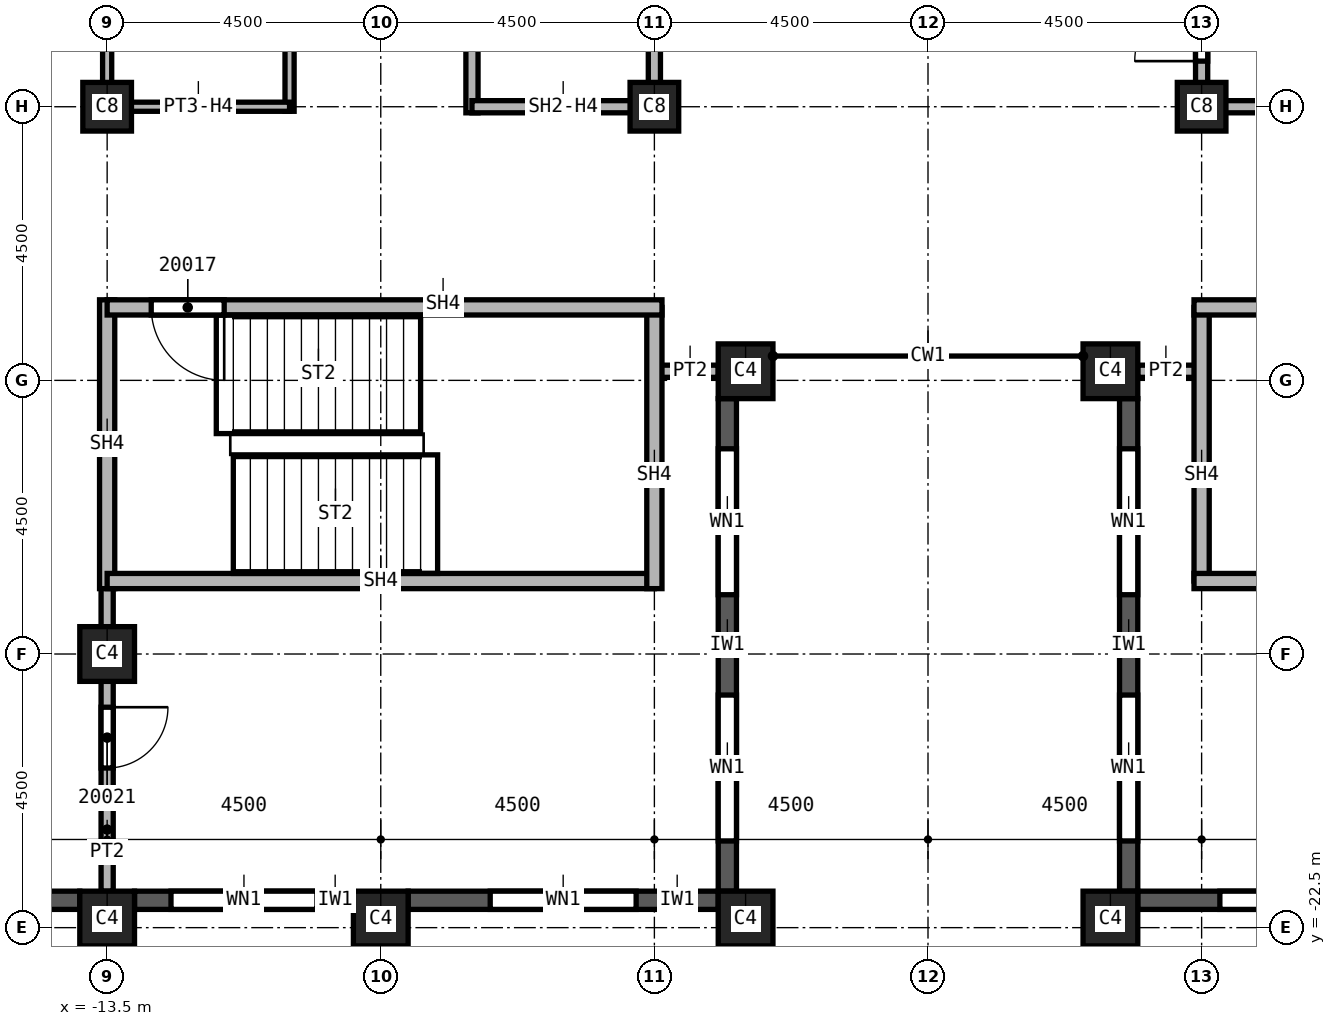
"""IFC4 building model, lengths in metres.
Left out: names, types, materials, properties, quantities, classifications, styles, units other than length and angle.
Written with IfcOpenShell. Run it as: python <this file> out.ifc"""

import sys

from ifc_helpers import new_model, si_unit, direction, frame, frame_2d, origin, origin_2d, place, context, subcontext, project, spatial, rectangle, extrude, element, fill, save


model = new_model("IFC4")
c1 = context("Model", 3, precision=1e-05, world=origin(), true_north=direction((0.0, 1.0)))
c2 = subcontext(c1, "Body", "Model", "MODEL_VIEW")
j1 = project(units=[si_unit("LENGTHUNIT", "METRE"), si_unit("PLANEANGLEUNIT", "RADIAN")], contexts=[c1])
p1 = place(None, origin())
s1 = spatial("IfcSite", under=j1, at=p1, CompositionType="ELEMENT")
p2 = place(p1, origin())
s2 = spatial("IfcBuilding", under=s1, at=p2, CompositionType="ELEMENT")
p3 = place(p2, frame((0.0, 0.0, 286.0)))
s3 = spatial("IfcBuildingStorey", under=s2, at=p3, CompositionType="ELEMENT", Elevation=286.0)
p4 = place(p3, frame((-13.5, -18.0, 0.0), z_axis=(0.0, 0.0, 1.0), x_axis=(1.0, 0.0, 0.0)))
e1 = element("IfcColumn", 1, at=p4, inside=s3, PredefinedType="COLUMN", context=c2, shape_type="SweptSolid", body=[
    extrude(rectangle(XDim=0.9, YDim=0.9, at=origin_2d()), origin(), (0.0, 0.0, 1.0), 3.72),
])
for number, where, z_axis, x_axis in (
    (2, (4.5, -9.0, 0.0), (0.0, 0.0, 1.0), (1.0, 0.0, 0.0)),
    (3, (-4.5, -9.0, 0.0), (0.0, 0.0, 1.0), (1.0, 0.0, 0.0)),
    (4, (-13.5, -9.0, 0.0), (0.0, 0.0, 1.0), (1.0, 0.0, 0.0)),
):
    element("IfcColumn", number, at=place(p3, frame(where, z_axis=z_axis, x_axis=x_axis)), inside=s3, PredefinedType="COLUMN", context=c2, shape_type="SweptSolid", body=[
        extrude(rectangle(XDim=0.8, YDim=0.8, at=origin_2d()), origin(), (0.0, 0.0, 1.0), 3.72),
    ])
for number, where, z_axis, x_axis in (
    (5, (3.0, -22.35, 0.0), (0.0, 0.0, 1.0), (1.0, 0.0, 0.0)),
    (6, (-3.0, -22.35, 0.0), (0.0, 0.0, 1.0), (1.0, 0.0, 0.0)),
    (7, (-9.0, -22.35, 0.0), (0.0, 0.0, 1.0), (1.0, 0.0, 0.0)),
    (8, (-13.5, -22.35, 0.0), (0.0, 0.0, 1.0), (1.0, 0.0, 0.0)),
    (9, (3.0, -13.35, 0.0), (0.0, 0.0, 1.0), (1.0, 0.0, 0.0)),
    (10, (-3.0, -13.35, 0.0), (0.0, 0.0, 1.0), (1.0, 0.0, 0.0)),
):
    element("IfcColumn", number, at=place(p3, frame(where, z_axis=z_axis, x_axis=x_axis)), inside=s3, PredefinedType="COLUMN", context=c2, shape_type="SweptSolid", body=[
        extrude(rectangle(XDim=0.9, YDim=0.9, at=origin_2d()), origin(), (0.0, 0.0, 1.0), 3.72),
    ])
p5 = place(p3, frame((-17.55, -22.05, 0.0), z_axis=(0.0, 0.0, 1.0), x_axis=(1.0, 0.0, 0.0)))
e11 = element("IfcWall", 11, at=p5, inside=s3, PredefinedType="SOLIDWALL", context=c2, shape_type="SweptSolid", body=[
    extrude(rectangle(XDim=3.6, YDim=0.3, at=frame_2d((1.8, 0.0))), origin(), (0.0, 0.0, 1.0), 3.12),
])
p6 = place(p5, frame((0.775, 0.0, 0.8)))
e12 = element("IfcOpeningElement", 12, at=p6, cuts=e11, PredefinedType="OPENING", context=c2, shape_type="SweptSolid", body=[
    extrude(rectangle(XDim=1.0, YDim=1.95, at=frame_2d((0.5, 0.975))), frame((0.0, 0.15, 0.0), z_axis=(0.0, -1.0, 0.0), x_axis=(1.0, 0.0, 0.0)), (0.0, 0.0, 1.0), 0.3),
])
p7 = place(p5, frame((2.375, 0.0, 0.8)))
e13 = element("IfcOpeningElement", 13, at=p7, cuts=e11, PredefinedType="OPENING", context=c2, shape_type="SweptSolid", body=[
    extrude(rectangle(XDim=0.6, YDim=1.95, at=frame_2d((0.3, 0.975))), frame((0.0, 0.15, 0.0), z_axis=(0.0, -1.0, 0.0), x_axis=(1.0, 0.0, 0.0)), (0.0, 0.0, 1.0), 0.3),
])
p8 = place(p3, frame((-13.05, -22.05, 0.0), z_axis=(0.0, 0.0, 1.0), x_axis=(1.0, 0.0, 0.0)))
e14 = element("IfcWall", 14, at=p8, inside=s3, PredefinedType="SOLIDWALL", context=c2, shape_type="SweptSolid", body=[
    extrude(rectangle(XDim=3.6, YDim=0.3, at=frame_2d((1.8, 0.0))), origin(), (0.0, 0.0, 1.0), 3.12),
])
p9 = place(p8, frame((0.6, 0.0, 0.8)))
e15 = element("IfcOpeningElement", 15, at=p9, cuts=e14, PredefinedType="OPENING", context=c2, shape_type="SweptSolid", body=[
    extrude(rectangle(XDim=2.4, YDim=1.95, at=frame_2d((1.2, 0.975))), frame((0.0, 0.15, 0.0), z_axis=(0.0, -1.0, 0.0), x_axis=(1.0, 0.0, 0.0)), (0.0, 0.0, 1.0), 0.3),
])
p10 = place(p3, frame((-8.55, -22.05, 0.0), z_axis=(0.0, 0.0, 1.0), x_axis=(1.0, 0.0, 0.0)))
e16 = element("IfcWall", 16, at=p10, inside=s3, PredefinedType="SOLIDWALL", context=c2, shape_type="SweptSolid", body=[
    extrude(rectangle(XDim=5.1, YDim=0.3, at=frame_2d((2.55, 0.0))), origin(), (0.0, 0.0, 1.0), 3.12),
])
p11 = place(p10, frame((1.35, 0.0, 0.8)))
e17 = element("IfcOpeningElement", 17, at=p11, cuts=e16, PredefinedType="OPENING", context=c2, shape_type="SweptSolid", body=[
    extrude(rectangle(XDim=2.4, YDim=1.95, at=frame_2d((1.2, 0.975))), frame((0.0, 0.15, 0.0), z_axis=(0.0, -1.0, 0.0), x_axis=(1.0, 0.0, 0.0)), (0.0, 0.0, 1.0), 0.3),
])
p12 = place(p3, frame((-3.3, -21.9, 0.0), z_axis=(0.0, 0.0, 1.0), x_axis=(0.0, 1.0, 0.0)))
e18 = element("IfcWall", 18, at=p12, inside=s3, PredefinedType="SOLIDWALL", context=c2, shape_type="SweptSolid", body=[
    extrude(rectangle(XDim=8.1, YDim=0.3, at=frame_2d((4.05, 0.0))), origin(), (0.0, 0.0, 1.0), 3.12),
])
p13 = place(p12, frame((0.825, 0.0, 0.8)))
e19 = element("IfcOpeningElement", 19, at=p13, cuts=e18, PredefinedType="OPENING", context=c2, shape_type="SweptSolid", body=[
    extrude(rectangle(XDim=2.4, YDim=1.95, at=frame_2d((1.2, 0.975))), frame((0.0, 0.15, 0.0), z_axis=(0.0, -1.0, 0.0), x_axis=(1.0, 0.0, 0.0)), (0.0, 0.0, 1.0), 0.3),
])
p14 = place(p12, frame((4.875, 0.0, 0.8)))
e20 = element("IfcOpeningElement", 20, at=p14, cuts=e18, PredefinedType="OPENING", context=c2, shape_type="SweptSolid", body=[
    extrude(rectangle(XDim=2.4, YDim=1.95, at=frame_2d((1.2, 0.975))), frame((0.0, 0.15, 0.0), z_axis=(0.0, -1.0, 0.0), x_axis=(1.0, 0.0, 0.0)), (0.0, 0.0, 1.0), 0.3),
])
p15 = place(p3, frame((3.3, -13.8, 0.0), z_axis=(0.0, 0.0, 1.0), x_axis=(0.0, -1.0, 0.0)))
e21 = element("IfcWall", 21, at=p15, inside=s3, PredefinedType="SOLIDWALL", context=c2, shape_type="SweptSolid", body=[
    extrude(rectangle(XDim=8.1, YDim=0.3, at=frame_2d((4.05, 0.0))), origin(), (0.0, 0.0, 1.0), 3.12),
])
p16 = place(p15, frame((0.825, 0.0, 0.8)))
e22 = element("IfcOpeningElement", 22, at=p16, cuts=e21, PredefinedType="OPENING", context=c2, shape_type="SweptSolid", body=[
    extrude(rectangle(XDim=2.4, YDim=1.95, at=frame_2d((1.2, 0.975))), frame((0.0, 0.15, 0.0), z_axis=(0.0, -1.0, 0.0), x_axis=(1.0, 0.0, 0.0)), (0.0, 0.0, 1.0), 0.3),
])
p17 = place(p15, frame((4.875, 0.0, 0.8)))
e23 = element("IfcOpeningElement", 23, at=p17, cuts=e21, PredefinedType="OPENING", context=c2, shape_type="SweptSolid", body=[
    extrude(rectangle(XDim=2.4, YDim=1.95, at=frame_2d((1.2, 0.975))), frame((0.0, 0.15, 0.0), z_axis=(0.0, -1.0, 0.0), x_axis=(1.0, 0.0, 0.0)), (0.0, 0.0, 1.0), 0.3),
])
p18 = place(p3, frame((3.45, -22.05, 0.0), z_axis=(0.0, 0.0, 1.0), x_axis=(1.0, 0.0, 0.0)))
e24 = element("IfcWall", 24, at=p18, inside=s3, PredefinedType="SOLIDWALL", context=c2, shape_type="SweptSolid", body=[
    extrude(rectangle(XDim=5.1, YDim=0.3, at=frame_2d((2.55, 0.0))), origin(), (0.0, 0.0, 1.0), 3.12),
])
p19 = place(p18, frame((1.35, 0.0, 0.8)))
e25 = element("IfcOpeningElement", 25, at=p19, cuts=e24, PredefinedType="OPENING", context=c2, shape_type="SweptSolid", body=[
    extrude(rectangle(XDim=2.4, YDim=1.95, at=frame_2d((1.2, 0.975))), frame((0.0, 0.15, 0.0), z_axis=(0.0, -1.0, 0.0), x_axis=(1.0, 0.0, 0.0)), (0.0, 0.0, 1.0), 0.3),
])
p20 = place(p3, frame((-13.5, -16.675, 0.0), z_axis=(0.0, 0.0, 1.0), x_axis=(0.0, -1.0, 0.0)))
e26 = element("IfcWall", 26, at=p20, inside=s3, PredefinedType="PARTITIONING", context=c2, shape_type="SweptSolid", body=[
    extrude(rectangle(XDim=5.225, YDim=0.2, at=frame_2d((2.612, 0.0))), origin(), (0.0, 0.0, 1.0), 3.72),
])
p21 = place(p20, frame((2.2, 0.0, 0.0)))
e27 = element("IfcOpeningElement", 27, at=p21, cuts=e26, PredefinedType="OPENING", context=c2, shape_type="SweptSolid", body=[
    extrude(rectangle(XDim=1.0, YDim=2.1, at=frame_2d((0.5, 1.05))), frame((0.0, 0.1, 0.0), z_axis=(0.0, -1.0, 0.0), x_axis=(1.0, 0.0, 0.0)), (0.0, 0.0, 1.0), 0.2),
])
for number, where, z_axis, x_axis in (
    (28, (-3.45, -13.35, 0.0), (0.0, 0.0, 1.0), (-1.0, 0.0, 0.0)),
    (29, (4.5, -13.35, 0.0), (0.0, 0.0, 1.0), (-1.0, 0.0, 0.0)),
):
    element("IfcWall", number, at=place(p3, frame(where, z_axis=z_axis, x_axis=x_axis)), inside=s3, PredefinedType="PARTITIONING", context=c2, shape_type="SweptSolid", body=[
        extrude(rectangle(XDim=1.05, YDim=0.2, at=frame_2d((0.525, 0.0))), origin(), (0.0, 0.0, 1.0), 3.72),
    ])
p22 = place(p3, frame((-7.5, -9.1, 0.0), z_axis=(0.0, 0.0, 1.0), x_axis=(0.0, 1.0, 0.0)))
e30 = element("IfcWall", 30, at=p22, inside=s3, PredefinedType="SOLIDWALL", context=c2, shape_type="SweptSolid", body=[
    extrude(rectangle(XDim=6.225, YDim=0.2, at=frame_2d((3.113, 0.0))), origin(), (0.0, 0.0, 1.0), 3.72),
])
p23 = place(p3, frame((-4.5, -9.0, 0.0), z_axis=(0.0, 0.0, 1.0), x_axis=(-1.0, 0.0, 0.0)))
e31 = element("IfcWall", 31, at=p23, inside=s3, PredefinedType="SOLIDWALL", context=c2, shape_type="SweptSolid", body=[
    extrude(rectangle(XDim=3.0, YDim=0.2, at=frame_2d((1.5, 0.0))), origin(), (0.0, 0.0, 1.0), 3.042),
])
p24 = place(p3, frame((-4.5, 0.0, 0.0), z_axis=(0.0, 0.0, 1.0), x_axis=(0.0, -1.0, 0.0)))
e32 = element("IfcWall", 32, at=p24, inside=s3, PredefinedType="SOLIDWALL", context=c2, shape_type="SweptSolid", body=[
    extrude(rectangle(XDim=9.1, YDim=0.2, at=frame_2d((4.55, 0.0))), origin(), (0.0, 0.0, 1.0), 3.042),
])
p25 = place(p24, frame((6.25, 0.0, 0.0)))
e33 = element("IfcOpeningElement", 33, at=p25, cuts=e32, PredefinedType="OPENING", context=c2, shape_type="SweptSolid", body=[
    extrude(rectangle(XDim=1.1, YDim=2.1, at=frame_2d((0.55, 1.05))), frame((0.0, 0.1, 0.0), z_axis=(0.0, -1.0, 0.0), x_axis=(1.0, 0.0, 0.0)), (0.0, 0.0, 1.0), 0.2),
])
p26 = place(p24, frame((4.6, 0.0, 0.0)))
e34 = element("IfcOpeningElement", 34, at=p26, cuts=e32, PredefinedType="OPENING", context=c2, shape_type="SweptSolid", body=[
    extrude(rectangle(XDim=1.1, YDim=2.1, at=frame_2d((0.55, 1.05))), frame((0.0, 0.1, 0.0), z_axis=(0.0, -1.0, 0.0), x_axis=(1.0, 0.0, 0.0)), (0.0, 0.0, 1.0), 0.2),
])
p27 = place(p3, frame((4.5, -9.1, 0.0), z_axis=(0.0, 0.0, 1.0), x_axis=(0.0, 1.0, 0.0)))
e35 = element("IfcWall", 35, at=p27, inside=s3, PredefinedType="SOLIDWALL", context=c2, shape_type="SweptSolid", body=[
    extrude(rectangle(XDim=3.1, YDim=0.2, at=frame_2d((1.55, 0.0))), origin(), (0.0, 0.0, 1.0), 3.042),
])
p28 = place(p27, frame((0.85, 0.0, 0.0)))
e36 = element("IfcOpeningElement", 36, at=p28, cuts=e35, PredefinedType="OPENING", context=c2, shape_type="SweptSolid", body=[
    extrude(rectangle(XDim=1.1, YDim=2.1, at=frame_2d((0.55, 1.05))), frame((0.0, 0.1, 0.0), z_axis=(0.0, -1.0, 0.0), x_axis=(1.0, 0.0, 0.0)), (0.0, 0.0, 1.0), 0.2),
])
p29 = place(p3, frame((7.5, -9.0, 0.0), z_axis=(0.0, 0.0, 1.0), x_axis=(-1.0, 0.0, 0.0)))
e37 = element("IfcWall", 37, at=p29, inside=s3, PredefinedType="SOLIDWALL", context=c2, shape_type="SweptSolid", body=[
    extrude(rectangle(XDim=3.0, YDim=0.2, at=frame_2d((1.5, 0.0))), origin(), (0.0, 0.0, 1.0), 3.042),
])
p30 = place(p3, frame((-13.5, -12.175, 0.0), z_axis=(0.0, 0.0, 1.0), x_axis=(0.0, -1.0, 0.0)))
e38 = element("IfcWall", 38, at=p30, inside=s3, PredefinedType="SOLIDWALL", context=c2, shape_type="SweptSolid", body=[
    extrude(rectangle(XDim=4.75, YDim=0.25, at=frame_2d((2.375, 0.0))), origin(), (0.0, 0.0, 1.0), 3.72),
])
p31 = place(p3, frame((-4.5, -16.8, 0.0), z_axis=(0.0, 0.0, 1.0), x_axis=(-1.0, 0.0, 0.0)))
e39 = element("IfcWall", 39, at=p31, inside=s3, PredefinedType="SOLIDWALL", context=c2, shape_type="SweptSolid", body=[
    extrude(rectangle(XDim=9.0, YDim=0.25, at=frame_2d((4.5, 0.0))), origin(), (0.0, 0.0, 1.0), 3.72),
])
p32 = place(p3, frame((-4.5, -12.3, 0.0), z_axis=(0.0, 0.0, 1.0), x_axis=(0.0, -1.0, 0.0)))
e40 = element("IfcWall", 40, at=p32, inside=s3, PredefinedType="SOLIDWALL", context=c2, shape_type="SweptSolid", body=[
    extrude(rectangle(XDim=4.625, YDim=0.25, at=frame_2d((2.312, 0.0))), origin(), (0.0, 0.0, 1.0), 3.72),
])
p33 = place(p3, frame((-4.375, -12.3, 0.0), z_axis=(0.0, 0.0, 1.0), x_axis=(-1.0, 0.0, 0.0)))
e41 = element("IfcWall", 41, at=p33, inside=s3, PredefinedType="SOLIDWALL", context=c2, shape_type="SweptSolid", body=[
    extrude(rectangle(XDim=9.125, YDim=0.25, at=frame_2d((4.562, 0.0))), origin(), (0.0, 0.0, 1.0), 3.72),
])
p34 = place(p33, frame((7.2, 0.0, 0.0)))
e42 = element("IfcOpeningElement", 42, at=p34, cuts=e41, PredefinedType="OPENING", context=c2, shape_type="SweptSolid", body=[
    extrude(rectangle(XDim=1.2, YDim=2.1, at=frame_2d((0.6, 1.05))), frame((0.0, 0.125, 0.0), z_axis=(0.0, -1.0, 0.0), x_axis=(1.0, 0.0, 0.0)), (0.0, 0.0, 1.0), 0.25),
])
p35 = place(p3, frame((4.5, -16.8, 0.0), z_axis=(0.0, 0.0, 1.0), x_axis=(0.0, 1.0, 0.0)))
e43 = element("IfcWall", 43, at=p35, inside=s3, PredefinedType="SOLIDWALL", context=c2, shape_type="SweptSolid", body=[
    extrude(rectangle(XDim=4.5, YDim=0.25, at=frame_2d((2.25, 0.0))), origin(), (0.0, 0.0, 1.0), 3.72),
])
p36 = place(p3, frame((13.5, -16.8, 0.0), z_axis=(0.0, 0.0, 1.0), x_axis=(-1.0, 0.0, 0.0)))
e44 = element("IfcWall", 44, at=p36, inside=s3, PredefinedType="SOLIDWALL", context=c2, shape_type="SweptSolid", body=[
    extrude(rectangle(XDim=9.125, YDim=0.25, at=frame_2d((4.562, 0.0))), origin(), (0.0, 0.0, 1.0), 3.72),
])
p37 = place(p3, frame((13.5, -12.3, 0.0), z_axis=(0.0, 0.0, 1.0), x_axis=(-1.0, 0.0, 0.0)))
e45 = element("IfcWall", 45, at=p37, inside=s3, PredefinedType="SOLIDWALL", context=c2, shape_type="SweptSolid", body=[
    extrude(rectangle(XDim=9.125, YDim=0.25, at=frame_2d((4.562, 0.0))), origin(), (0.0, 0.0, 1.0), 3.72),
])
p38 = place(p37, frame((0.6, 0.0, 0.0)))
e46 = element("IfcOpeningElement", 46, at=p38, cuts=e45, PredefinedType="OPENING", context=c2, shape_type="SweptSolid", body=[
    extrude(rectangle(XDim=1.2, YDim=2.1, at=frame_2d((0.6, 1.05))), frame((0.0, 0.125, 0.0), z_axis=(0.0, -1.0, 0.0), x_axis=(1.0, 0.0, 0.0)), (0.0, 0.0, 1.0), 0.25),
])
p39 = place(p3, frame((-13.5, -9.075, 0.0), z_axis=(0.0, 0.0, 1.0), x_axis=(0.0, 1.0, 0.0)))
e47 = element("IfcWall", 47, at=p39, inside=s3, PredefinedType="PARTITIONING", context=c2, shape_type="SweptSolid", body=[
    extrude(rectangle(XDim=4.575, YDim=0.15, at=frame_2d((2.288, 0.0))), origin(), (0.0, 0.0, 1.0), 3.042),
])
p40 = place(p3, frame((-10.5, -9.075, 0.0), z_axis=(0.0, 0.0, 1.0), x_axis=(0.0, 1.0, 0.0)))
e48 = element("IfcWall", 48, at=p40, inside=s3, PredefinedType="PARTITIONING", context=c2, shape_type="SweptSolid", body=[
    extrude(rectangle(XDim=4.65, YDim=0.15, at=frame_2d((2.325, 0.0))), origin(), (0.0, 0.0, 1.0), 3.72),
])
p41 = place(p40, frame((2.8, 0.0, 0.0)))
e49 = element("IfcOpeningElement", 49, at=p41, cuts=e48, PredefinedType="OPENING", context=c2, shape_type="SweptSolid", body=[
    extrude(rectangle(XDim=0.9, YDim=2.1, at=frame_2d((0.45, 1.05))), frame((0.0, 0.075, 0.0), z_axis=(0.0, -1.0, 0.0), x_axis=(1.0, 0.0, 0.0)), (0.0, 0.0, 1.0), 0.15),
])
p42 = place(p3, frame((-10.5, -9.0, 0.0), z_axis=(0.0, 0.0, 1.0), x_axis=(-1.0, 0.0, 0.0)))
e50 = element("IfcWall", 50, at=p42, inside=s3, PredefinedType="PARTITIONING", context=c2, shape_type="SweptSolid", body=[
    extrude(rectangle(XDim=3.0, YDim=0.15, at=frame_2d((1.5, 0.0))), origin(), (0.0, 0.0, 1.0), 3.042),
])
p43 = place(p9, origin())
e51 = element("IfcWindow", 51, at=p43, inside=s3, PartitioningType="SINGLE_PANEL", PredefinedType="WINDOW", context=c2, shape_type="SweptSolid", body=[
    extrude(rectangle(XDim=2.4, YDim=1.95, at=frame_2d((1.2, 0.975))), frame((0.0, 0.03, 0.0), z_axis=(0.0, -1.0, 0.0), x_axis=(1.0, 0.0, 0.0)), (0.0, 0.0, 1.0), 0.06),
])
fill(e15, e51)
p44 = place(p11, origin())
e52 = element("IfcWindow", 52, at=p44, inside=s3, PartitioningType="SINGLE_PANEL", PredefinedType="WINDOW", context=c2, shape_type="SweptSolid", body=[
    extrude(rectangle(XDim=2.4, YDim=1.95, at=frame_2d((1.2, 0.975))), frame((0.0, 0.03, 0.0), z_axis=(0.0, -1.0, 0.0), x_axis=(1.0, 0.0, 0.0)), (0.0, 0.0, 1.0), 0.06),
])
fill(e17, e52)
p45 = place(p13, origin())
e53 = element("IfcWindow", 53, at=p45, inside=s3, PartitioningType="SINGLE_PANEL", PredefinedType="WINDOW", context=c2, shape_type="SweptSolid", body=[
    extrude(rectangle(XDim=2.4, YDim=1.95, at=frame_2d((1.2, 0.975))), frame((0.0, 0.03, 0.0), z_axis=(0.0, -1.0, 0.0), x_axis=(1.0, 0.0, 0.0)), (0.0, 0.0, 1.0), 0.06),
])
fill(e19, e53)
p46 = place(p14, origin())
e54 = element("IfcWindow", 54, at=p46, inside=s3, PartitioningType="SINGLE_PANEL", PredefinedType="WINDOW", context=c2, shape_type="SweptSolid", body=[
    extrude(rectangle(XDim=2.4, YDim=1.95, at=frame_2d((1.2, 0.975))), frame((0.0, 0.03, 0.0), z_axis=(0.0, -1.0, 0.0), x_axis=(1.0, 0.0, 0.0)), (0.0, 0.0, 1.0), 0.06),
])
fill(e20, e54)
p47 = place(p16, origin())
e55 = element("IfcWindow", 55, at=p47, inside=s3, PartitioningType="SINGLE_PANEL", PredefinedType="WINDOW", context=c2, shape_type="SweptSolid", body=[
    extrude(rectangle(XDim=2.4, YDim=1.95, at=frame_2d((1.2, 0.975))), frame((0.0, 0.03, 0.0), z_axis=(0.0, -1.0, 0.0), x_axis=(1.0, 0.0, 0.0)), (0.0, 0.0, 1.0), 0.06),
])
fill(e22, e55)
p48 = place(p17, origin())
e56 = element("IfcWindow", 56, at=p48, inside=s3, PartitioningType="SINGLE_PANEL", PredefinedType="WINDOW", context=c2, shape_type="SweptSolid", body=[
    extrude(rectangle(XDim=2.4, YDim=1.95, at=frame_2d((1.2, 0.975))), frame((0.0, 0.03, 0.0), z_axis=(0.0, -1.0, 0.0), x_axis=(1.0, 0.0, 0.0)), (0.0, 0.0, 1.0), 0.06),
])
fill(e23, e56)
p49 = place(p19, origin())
e57 = element("IfcWindow", 57, at=p49, inside=s3, PartitioningType="SINGLE_PANEL", PredefinedType="WINDOW", context=c2, shape_type="SweptSolid", body=[
    extrude(rectangle(XDim=2.4, YDim=1.95, at=frame_2d((1.2, 0.975))), frame((0.0, 0.03, 0.0), z_axis=(0.0, -1.0, 0.0), x_axis=(1.0, 0.0, 0.0)), (0.0, 0.0, 1.0), 0.06),
])
fill(e25, e57)
p50 = place(p28, origin())
e58 = element("IfcDoor", 58, at=p50, inside=s3, OperationType="SINGLE_SWING_RIGHT", PredefinedType="DOOR", context=c2, shape_type="SweptSolid", body=[
    extrude(rectangle(XDim=1.1, YDim=2.1, at=frame_2d((0.55, 1.05))), frame((0.0, 0.025, 0.0), z_axis=(0.0, -1.0, 0.0), x_axis=(1.0, 0.0, 0.0)), (0.0, 0.0, 1.0), 0.05),
])
fill(e36, e58)
p51 = place(p34, origin())
e59 = element("IfcDoor", 59, at=p51, inside=s3, OperationType="SINGLE_SWING_RIGHT", PredefinedType="DOOR", context=c2, shape_type="SweptSolid", body=[
    extrude(rectangle(XDim=1.2, YDim=2.1, at=frame_2d((0.6, 1.05))), frame((0.0, 0.025, 0.0), z_axis=(0.0, -1.0, 0.0), x_axis=(1.0, 0.0, 0.0)), (0.0, 0.0, 1.0), 0.05),
])
fill(e42, e59)
p52 = place(p21, origin())
e60 = element("IfcDoor", 60, at=p52, inside=s3, OperationType="SINGLE_SWING_RIGHT", PredefinedType="DOOR", context=c2, shape_type="SweptSolid", body=[
    extrude(rectangle(XDim=1.0, YDim=2.1, at=frame_2d((0.5, 1.05))), frame((0.0, 0.025, 0.0), z_axis=(0.0, -1.0, 0.0), x_axis=(1.0, 0.0, 0.0)), (0.0, 0.0, 1.0), 0.05),
])
fill(e27, e60)
save(model, sys.argv[1])
